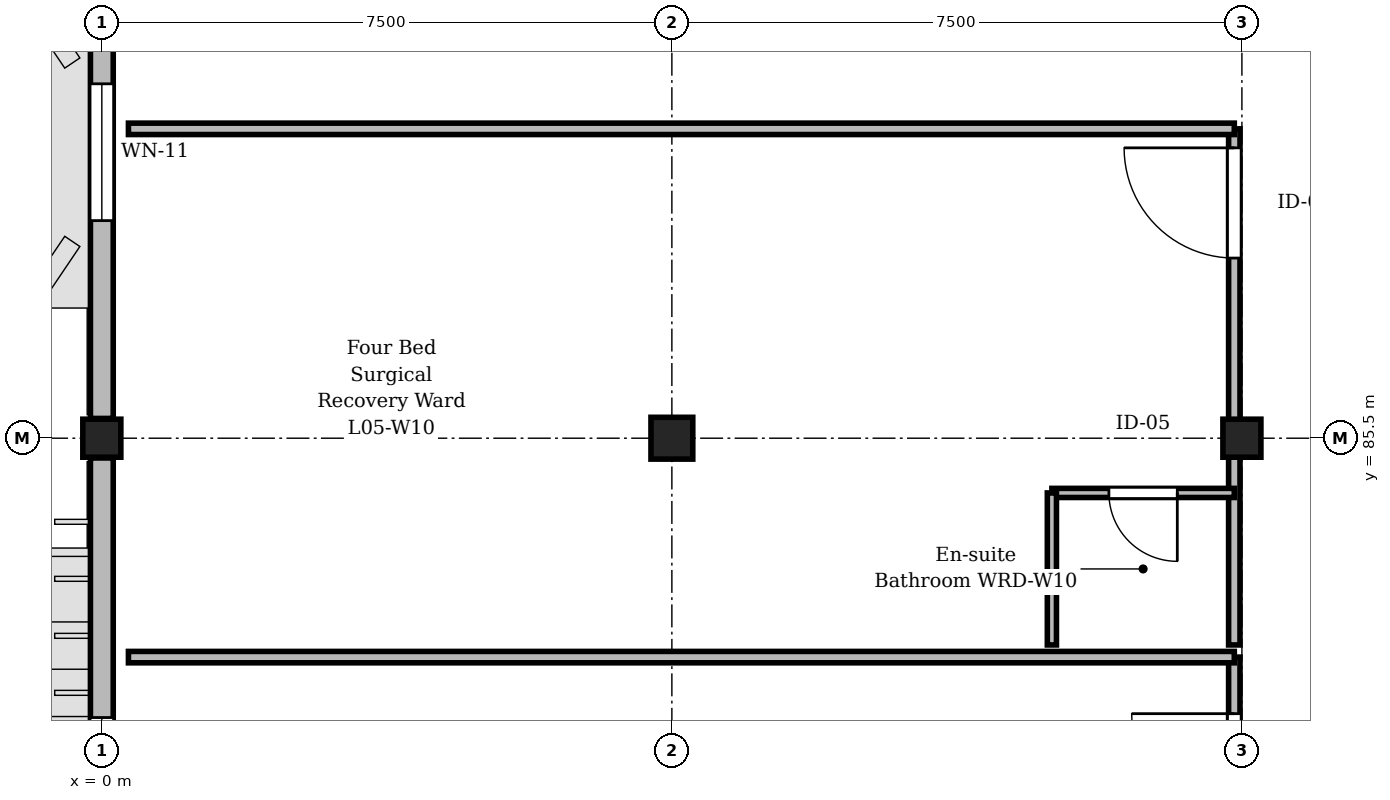
"""IFC4 building model, lengths in metres.
Left out: names, types, materials, properties, quantities, classifications, styles, units other than length and angle.
Written with IfcOpenShell. Run it as: python <this file> out.ifc"""

import sys

from ifc_helpers import new_model, si_unit, direction, frame, frame_2d, origin, origin_2d, place, context, subcontext, project, spatial, rectangle, extrude, element, fill, save


model = new_model("IFC4")
c1 = context("Model", 3, precision=1e-05, world=origin(), true_north=direction((0.0, 1.0)))
c2 = subcontext(c1, "Body", "Model", "MODEL_VIEW")
j1 = project(units=[si_unit("LENGTHUNIT", "METRE"), si_unit("PLANEANGLEUNIT", "RADIAN")], contexts=[c1])
p1 = place(None, origin())
s1 = spatial("IfcSite", under=j1, at=p1, CompositionType="ELEMENT")
p2 = place(p1, origin())
s2 = spatial("IfcBuilding", under=s1, at=p2, CompositionType="ELEMENT")
p3 = place(p2, frame((0.0, 0.0, 21.9)))
s3 = spatial("IfcBuildingStorey", under=s2, at=p3, CompositionType="ELEMENT", Elevation=21.9)
p4 = place(p3, frame((0.0, 85.5, 0.0), z_axis=(0.0, 0.0, 1.0), x_axis=(1.0, 0.0, 0.0)))
e1 = element("IfcColumn", 1, at=p4, inside=s3, PredefinedType="COLUMN", context=c2, shape_type="SweptSolid", body=[
    extrude(rectangle(XDim=0.5, YDim=0.5, at=origin_2d()), origin(), (0.0, 0.0, 1.0), 4.05),
])
p5 = place(p3, frame((7.5, 85.5, 0.0), z_axis=(0.0, 0.0, 1.0), x_axis=(1.0, 0.0, 0.0)))
e2 = element("IfcColumn", 2, at=p5, inside=s3, PredefinedType="COLUMN", context=c2, shape_type="SweptSolid", body=[
    extrude(rectangle(XDim=0.55, YDim=0.55, at=origin_2d()), origin(), (0.0, 0.0, 1.0), 4.05),
])
p6 = place(p3, frame((15.0, 85.5, 0.0), z_axis=(0.0, 0.0, 1.0), x_axis=(1.0, 0.0, 0.0)))
e3 = element("IfcColumn", 3, at=p6, inside=s3, PredefinedType="COLUMN", context=c2, shape_type="SweptSolid", body=[
    extrude(rectangle(XDim=0.5, YDim=0.5, at=origin_2d()), origin(), (0.0, 0.0, 1.0), 4.05),
])
p7 = place(p3, frame((0.0, 76.81, 0.0), z_axis=(0.0, 0.0, 1.0), x_axis=(0.0, 1.0, 0.0)))
e4 = element("IfcWall", 4, at=p7, inside=s3, PredefinedType="STANDARD", context=c2, shape_type="SweptSolid", body=[
    extrude(rectangle(XDim=8.43, YDim=0.3, at=frame_2d((4.215, 0.0))), origin(), (0.0, 0.0, 1.0), 3.22),
])
p8 = place(p7, frame((3.415, 0.0, 0.9)))
e5 = element("IfcOpeningElement", 5, at=p8, cuts=e4, PredefinedType="OPENING", context=c2, shape_type="SweptSolid", body=[
    extrude(rectangle(XDim=1.6, YDim=1.95, at=frame_2d((0.8, 0.975))), frame((0.0, 0.16, 0.0), z_axis=(0.0, -1.0, 0.0), x_axis=(1.0, 0.0, 0.0)), (0.0, 0.0, 1.0), 0.32),
])
p9 = place(p3, frame((0.0, 85.76, 0.0), z_axis=(0.0, 0.0, 1.0), x_axis=(0.0, 1.0, 0.0)))
e6 = element("IfcWall", 6, at=p9, inside=s3, PredefinedType="STANDARD", context=c2, shape_type="SweptSolid", body=[
    extrude(rectangle(XDim=7.005, YDim=0.3, at=frame_2d((3.502, 0.0))), origin(), (0.0, 0.0, 1.0), 3.17),
])
p10 = place(p9, frame((2.603, 0.0, 0.9)))
e7 = element("IfcOpeningElement", 7, at=p10, cuts=e6, PredefinedType="OPENING", context=c2, shape_type="SweptSolid", body=[
    extrude(rectangle(XDim=1.8, YDim=1.95, at=frame_2d((0.9, 0.975))), frame((0.0, 0.16, 0.0), z_axis=(0.0, -1.0, 0.0), x_axis=(1.0, 0.0, 0.0)), (0.0, 0.0, 1.0), 0.32),
])
p11 = place(p3, frame((14.9, 75.83, 0.0), z_axis=(0.0, 0.0, 1.0), x_axis=(0.0, 1.0, 0.0)))
e8 = element("IfcWall", 8, at=p11, inside=s3, PredefinedType="PARTITIONING", context=c2, shape_type="SweptSolid", body=[
    extrude(rectangle(XDim=6.79, YDim=0.15, at=frame_2d((3.395, 0.0))), origin(), (0.0, 0.0, 1.0), 3.055),
])
p12 = place(p11, frame((4.696, 0.0, 0.0)))
e9 = element("IfcOpeningElement", 9, at=p12, cuts=e8, PredefinedType="OPENING", context=c2, shape_type="SweptSolid", body=[
    extrude(rectangle(XDim=1.35, YDim=2.25, at=frame_2d((0.675, 1.125))), frame((0.0, 0.085, 0.0), z_axis=(0.0, -1.0, 0.0), x_axis=(1.0, 0.0, 0.0)), (0.0, 0.0, 1.0), 0.17),
])
p13 = place(p3, frame((14.9, 82.78, 0.0), z_axis=(0.0, 0.0, 1.0), x_axis=(0.0, 1.0, 0.0)))
e10 = element("IfcWall", 10, at=p13, inside=s3, PredefinedType="PARTITIONING", context=c2, shape_type="SweptSolid", body=[
    extrude(rectangle(XDim=6.79, YDim=0.15, at=frame_2d((3.395, 0.0))), origin(), (0.0, 0.0, 1.0), 3.055),
])
p14 = place(p13, frame((5.09, 0.0, 0.0)))
e11 = element("IfcOpeningElement", 11, at=p14, cuts=e10, PredefinedType="OPENING", context=c2, shape_type="SweptSolid", body=[
    extrude(rectangle(XDim=1.45, YDim=2.3, at=frame_2d((0.725, 1.15))), frame((0.0, 0.085, 0.0), z_axis=(0.0, -1.0, 0.0), x_axis=(1.0, 0.0, 0.0)), (0.0, 0.0, 1.0), 0.17),
])
p15 = place(p3, frame((14.9, 84.78, 0.0), z_axis=(0.0, 0.0, 1.0), x_axis=(-1.0, 0.0, 0.0)))
e12 = element("IfcWall", 12, at=p15, inside=s3, PredefinedType="PARTITIONING", context=c2, shape_type="SweptSolid", body=[
    extrude(rectangle(XDim=2.4, YDim=0.12, at=frame_2d((1.2, 0.0))), origin(), (0.0, 0.0, 1.0), 3.755),
])
p16 = place(p15, frame((0.75, 0.0, 0.0)))
e13 = element("IfcOpeningElement", 13, at=p16, cuts=e12, PredefinedType="OPENING", context=c2, shape_type="SweptSolid", body=[
    extrude(rectangle(XDim=0.9, YDim=2.1, at=frame_2d((0.45, 1.05))), frame((0.0, 0.07, 0.0), z_axis=(0.0, -1.0, 0.0), x_axis=(1.0, 0.0, 0.0)), (0.0, 0.0, 1.0), 0.14),
])
p17 = place(p3, frame((12.5, 82.78, 0.0), z_axis=(0.0, 0.0, 1.0), x_axis=(0.0, 1.0, 0.0)))
e14 = element("IfcWall", 14, at=p17, inside=s3, PredefinedType="PARTITIONING", context=c2, shape_type="SweptSolid", body=[
    extrude(rectangle(XDim=2.0, YDim=0.12, at=frame_2d((1.0, 0.0))), origin(), (0.0, 0.0, 1.0), 3.755),
])
for number, where, z_axis, x_axis in (
    (15, (0.35, 82.62, 0.0), (0.0, 0.0, 1.0), (1.0, 0.0, 0.0)),
    (16, (0.35, 89.57, 0.0), (0.0, 0.0, 1.0), (1.0, 0.0, 0.0)),
):
    element("IfcWall", number, at=place(p3, frame(where, z_axis=z_axis, x_axis=x_axis)), inside=s3, PredefinedType="PARTITIONING", context=c2, shape_type="SweptSolid", body=[
        extrude(rectangle(XDim=14.55, YDim=0.15, at=frame_2d((7.275, 0.0))), origin(), (0.0, 0.0, 1.0), 3.755),
    ])
p18 = place(p8, origin())
e17 = element("IfcWindow", 17, at=p18, inside=s3, PartitioningType="SINGLE_PANEL", PredefinedType="WINDOW", context=c2, shape_type="SweptSolid", body=[
    extrude(rectangle(XDim=1.6, YDim=1.95, at=frame_2d((0.8, 0.975))), frame((0.0, 0.03, 0.0), z_axis=(0.0, -1.0, 0.0), x_axis=(1.0, 0.0, 0.0)), (0.0, 0.0, 1.0), 0.06),
])
fill(e5, e17)
p19 = place(p10, origin())
e18 = element("IfcWindow", 18, at=p19, inside=s3, PartitioningType="SINGLE_PANEL", PredefinedType="WINDOW", context=c2, shape_type="SweptSolid", body=[
    extrude(rectangle(XDim=1.8, YDim=1.95, at=frame_2d((0.9, 0.975))), frame((0.0, 0.03, 0.0), z_axis=(0.0, -1.0, 0.0), x_axis=(1.0, 0.0, 0.0)), (0.0, 0.0, 1.0), 0.06),
])
fill(e7, e18)
p20 = place(p12, origin())
e19 = element("IfcDoor", 19, at=p20, inside=s3, OperationType="SINGLE_SWING_RIGHT", PredefinedType="DOOR", context=c2, shape_type="SweptSolid", body=[
    extrude(rectangle(XDim=1.35, YDim=2.25, at=frame_2d((0.675, 1.125))), frame((0.0, 0.025, 0.0), z_axis=(0.0, -1.0, 0.0), x_axis=(1.0, 0.0, 0.0)), (0.0, 0.0, 1.0), 0.05),
])
fill(e9, e19)
p21 = place(p14, origin())
e20 = element("IfcDoor", 20, at=p21, inside=s3, OperationType="SINGLE_SWING_RIGHT", PredefinedType="DOOR", context=c2, shape_type="SweptSolid", body=[
    extrude(rectangle(XDim=1.45, YDim=2.3, at=frame_2d((0.725, 1.15))), frame((0.0, 0.025, 0.0), z_axis=(0.0, -1.0, 0.0), x_axis=(1.0, 0.0, 0.0)), (0.0, 0.0, 1.0), 0.05),
])
fill(e11, e20)
p22 = place(p16, origin())
e21 = element("IfcDoor", 21, at=p22, inside=s3, OperationType="SINGLE_SWING_LEFT", PredefinedType="DOOR", context=c2, shape_type="SweptSolid", body=[
    extrude(rectangle(XDim=0.9, YDim=2.1, at=frame_2d((0.45, 1.05))), frame((0.0, 0.025, 0.0), z_axis=(0.0, -1.0, 0.0), x_axis=(1.0, 0.0, 0.0)), (0.0, 0.0, 1.0), 0.05),
])
fill(e13, e21)
save(model, sys.argv[1])
